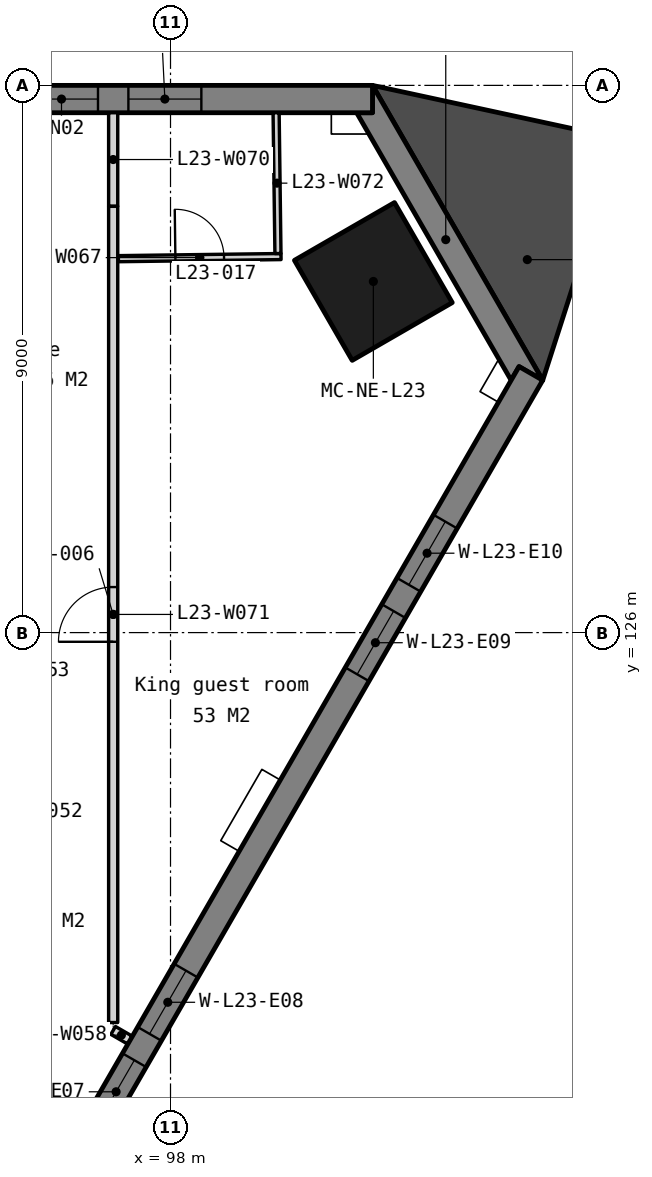
"""IFC4 building model, lengths in metres.
Left out: names, types, materials, properties, quantities, classifications, styles, units other than length and angle.
Written with IfcOpenShell. Run it as: python <this file> out.ifc"""

import sys

from ifc_helpers import new_model, si_unit, direction, frame, frame_2d, origin, origin_2d, place, context, subcontext, project, spatial, polyline, rectangle, outline, extrude, element, fill, save


model = new_model("IFC4")
c1 = context("Model", 3, precision=1e-05, world=origin(), true_north=direction((0.0, 1.0)))
c2 = subcontext(c1, "Body", "Model", "MODEL_VIEW")
j1 = project(units=[si_unit("LENGTHUNIT", "METRE"), si_unit("PLANEANGLEUNIT", "RADIAN")], contexts=[c1])
p1 = place(None, origin())
s1 = spatial("IfcSite", under=j1, at=p1, CompositionType="ELEMENT")
p2 = place(p1, origin())
s2 = spatial("IfcBuilding", under=s1, at=p2, CompositionType="ELEMENT")
p3 = place(p2, frame((0.0, 0.0, 95.8)))
s3 = spatial("IfcBuildingStorey", under=s2, at=p3, CompositionType="ELEMENT", Elevation=95.8)
p4 = place(p3, frame((101.336, 131.775, 0.0), z_axis=(0.0, 0.0, 1.0), x_axis=(-0.5, 0.866025403784, 0.0)))
e1 = element("IfcColumn", 1, at=p4, inside=s3, PredefinedType="COLUMN", context=c2, shape_type="SweptSolid", body=[
    extrude(rectangle(XDim=1.9, YDim=1.9, at=origin_2d()), origin(), (0.0, 0.0, 1.0), 3.5),
])
p5 = place(p3, frame((0.0, 0.0, -0.15)))
e2 = element("IfcWall", 2, at=p5, inside=s3, PredefinedType="SOLIDWALL", context=c2, shape_type="SweptSolid", body=[
    extrude(outline(polyline([(104.122, 130.15), (103.732, 130.375), (103.602, 130.15), (101.062, 134.55), (101.322, 134.55), (101.322, 135.0), (104.122, 130.15)])), origin(), (0.0, 0.0, 1.0), 3.5),
])
p6 = place(p3, frame((101.322, 134.775, -0.15), z_axis=(0.0, 0.0, 1.0), x_axis=(-1.0, 0.0, 0.0)))
e3 = element("IfcWall", 3, at=p6, inside=s3, PredefinedType="SOLIDWALL", context=c2, shape_type="SweptSolid", body=[
    extrude(outline(polyline([(0.0, 0.0), (0.0, 3.5), (36.779, 3.5), (36.779, 0.0), (0.0, 0.0)])), frame((0.0, 0.225, 0.0), z_axis=(0.0, -1.0, 0.0), x_axis=(1.0, 0.0, 0.0)), (0.0, 0.0, 1.0), 0.45),
])
p7 = place(p6, frame((2.814, 0.0, 1.05)))
e4 = element("IfcOpeningElement", 4, at=p7, cuts=e3, PredefinedType="OPENING", context=c2, shape_type="SweptSolid", body=[
    extrude(rectangle(XDim=1.2, YDim=1.5, at=frame_2d((0.6, 0.75))), frame((0.0, 0.235, 0.0), z_axis=(0.0, -1.0, 0.0), x_axis=(1.0, 0.0, 0.0)), (0.0, 0.0, 1.0), 0.47),
])
p8 = place(p6, frame((4.514, 0.0, 1.05)))
e5 = element("IfcOpeningElement", 5, at=p8, cuts=e3, PredefinedType="OPENING", context=c2, shape_type="SweptSolid", body=[
    extrude(rectangle(XDim=1.2, YDim=1.5, at=frame_2d((0.6, 0.75))), frame((0.0, 0.235, 0.0), z_axis=(0.0, -1.0, 0.0), x_axis=(1.0, 0.0, 0.0)), (0.0, 0.0, 1.0), 0.47),
])
p9 = place(p6, frame((11.343, 0.0, 1.05)))
e6 = element("IfcOpeningElement", 6, at=p9, cuts=e3, PredefinedType="OPENING", context=c2, shape_type="SweptSolid", body=[
    extrude(rectangle(XDim=1.2, YDim=1.5, at=frame_2d((0.6, 0.75))), frame((0.0, 0.235, 0.0), z_axis=(0.0, -1.0, 0.0), x_axis=(1.0, 0.0, 0.0)), (0.0, 0.0, 1.0), 0.47),
])
p10 = place(p6, frame((13.043, 0.0, 1.05)))
e7 = element("IfcOpeningElement", 7, at=p10, cuts=e3, PredefinedType="OPENING", context=c2, shape_type="SweptSolid", body=[
    extrude(rectangle(XDim=1.2, YDim=1.5, at=frame_2d((0.6, 0.75))), frame((0.0, 0.235, 0.0), z_axis=(0.0, -1.0, 0.0), x_axis=(1.0, 0.0, 0.0)), (0.0, 0.0, 1.0), 0.47),
])
p11 = place(p6, frame((19.872, 0.0, 1.05)))
e8 = element("IfcOpeningElement", 8, at=p11, cuts=e3, PredefinedType="OPENING", context=c2, shape_type="SweptSolid", body=[
    extrude(rectangle(XDim=1.2, YDim=1.5, at=frame_2d((0.6, 0.75))), frame((0.0, 0.235, 0.0), z_axis=(0.0, -1.0, 0.0), x_axis=(1.0, 0.0, 0.0)), (0.0, 0.0, 1.0), 0.47),
])
p12 = place(p6, frame((21.572, 0.0, 1.05)))
e9 = element("IfcOpeningElement", 9, at=p12, cuts=e3, PredefinedType="OPENING", context=c2, shape_type="SweptSolid", body=[
    extrude(rectangle(XDim=1.2, YDim=1.5, at=frame_2d((0.6, 0.75))), frame((0.0, 0.235, 0.0), z_axis=(0.0, -1.0, 0.0), x_axis=(1.0, 0.0, 0.0)), (0.0, 0.0, 1.0), 0.47),
])
p13 = place(p6, frame((28.4, 0.0, 1.05)))
e10 = element("IfcOpeningElement", 10, at=p13, cuts=e3, PredefinedType="OPENING", context=c2, shape_type="SweptSolid", body=[
    extrude(rectangle(XDim=1.2, YDim=1.5, at=frame_2d((0.6, 0.75))), frame((0.0, 0.235, 0.0), z_axis=(0.0, -1.0, 0.0), x_axis=(1.0, 0.0, 0.0)), (0.0, 0.0, 1.0), 0.47),
])
p14 = place(p6, frame((30.1, 0.0, 1.05)))
e11 = element("IfcOpeningElement", 11, at=p14, cuts=e3, PredefinedType="OPENING", context=c2, shape_type="SweptSolid", body=[
    extrude(rectangle(XDim=1.2, YDim=1.5, at=frame_2d((0.6, 0.75))), frame((0.0, 0.235, 0.0), z_axis=(0.0, -1.0, 0.0), x_axis=(1.0, 0.0, 0.0)), (0.0, 0.0, 1.0), 0.47),
])
p15 = place(p3, frame((82.605, 93.333, -0.15), z_axis=(0.0, 0.0, 1.0), x_axis=(0.500000478905, 0.866025127289, 0.0)))
e12 = element("IfcWall", 12, at=p15, inside=s3, PredefinedType="SOLIDWALL", context=c2, shape_type="SweptSolid", body=[
    extrude(outline(polyline([(42.643, 0.0), (42.643, 3.5), (0.0, 3.5), (0.0, 0.0), (42.643, 0.0)])), frame((0.0, 0.225, 0.0), z_axis=(0.0, -1.0, 0.0), x_axis=(1.0, 0.0, 0.0)), (0.0, 0.0, 1.0), 0.45),
])
p16 = place(p15, frame((2.814, 0.0, 1.05)))
e13 = element("IfcOpeningElement", 13, at=p16, cuts=e12, PredefinedType="OPENING", context=c2, shape_type="SweptSolid", body=[
    extrude(rectangle(XDim=1.2, YDim=1.5, at=frame_2d((0.6, 0.75))), frame((0.0, 0.235, 0.0), z_axis=(0.0, -1.0, 0.0), x_axis=(1.0, 0.0, 0.0)), (0.0, 0.0, 1.0), 0.47),
])
p17 = place(p15, frame((4.514, 0.0, 1.05)))
e14 = element("IfcOpeningElement", 14, at=p17, cuts=e12, PredefinedType="OPENING", context=c2, shape_type="SweptSolid", body=[
    extrude(rectangle(XDim=1.2, YDim=1.5, at=frame_2d((0.6, 0.75))), frame((0.0, 0.235, 0.0), z_axis=(0.0, -1.0, 0.0), x_axis=(1.0, 0.0, 0.0)), (0.0, 0.0, 1.0), 0.47),
])
p18 = place(p15, frame((11.343, 0.0, 1.05)))
e15 = element("IfcOpeningElement", 15, at=p18, cuts=e12, PredefinedType="OPENING", context=c2, shape_type="SweptSolid", body=[
    extrude(rectangle(XDim=1.2, YDim=1.5, at=frame_2d((0.6, 0.75))), frame((0.0, 0.235, 0.0), z_axis=(0.0, -1.0, 0.0), x_axis=(1.0, 0.0, 0.0)), (0.0, 0.0, 1.0), 0.47),
])
p19 = place(p15, frame((13.043, 0.0, 1.05)))
e16 = element("IfcOpeningElement", 16, at=p19, cuts=e12, PredefinedType="OPENING", context=c2, shape_type="SweptSolid", body=[
    extrude(rectangle(XDim=1.2, YDim=1.5, at=frame_2d((0.6, 0.75))), frame((0.0, 0.235, 0.0), z_axis=(0.0, -1.0, 0.0), x_axis=(1.0, 0.0, 0.0)), (0.0, 0.0, 1.0), 0.47),
])
p20 = place(p15, frame((19.872, 0.0, 1.05)))
e17 = element("IfcOpeningElement", 17, at=p20, cuts=e12, PredefinedType="OPENING", context=c2, shape_type="SweptSolid", body=[
    extrude(rectangle(XDim=1.2, YDim=1.5, at=frame_2d((0.6, 0.75))), frame((0.0, 0.235, 0.0), z_axis=(0.0, -1.0, 0.0), x_axis=(1.0, 0.0, 0.0)), (0.0, 0.0, 1.0), 0.47),
])
p21 = place(p15, frame((21.572, 0.0, 1.05)))
e18 = element("IfcOpeningElement", 18, at=p21, cuts=e12, PredefinedType="OPENING", context=c2, shape_type="SweptSolid", body=[
    extrude(rectangle(XDim=1.2, YDim=1.5, at=frame_2d((0.6, 0.75))), frame((0.0, 0.235, 0.0), z_axis=(0.0, -1.0, 0.0), x_axis=(1.0, 0.0, 0.0)), (0.0, 0.0, 1.0), 0.47),
])
p22 = place(p15, frame((28.4, 0.0, 1.05)))
e19 = element("IfcOpeningElement", 19, at=p22, cuts=e12, PredefinedType="OPENING", context=c2, shape_type="SweptSolid", body=[
    extrude(rectangle(XDim=1.2, YDim=1.5, at=frame_2d((0.6, 0.75))), frame((0.0, 0.235, 0.0), z_axis=(0.0, -1.0, 0.0), x_axis=(1.0, 0.0, 0.0)), (0.0, 0.0, 1.0), 0.47),
])
p23 = place(p15, frame((30.1, 0.0, 1.05)))
e20 = element("IfcOpeningElement", 20, at=p23, cuts=e12, PredefinedType="OPENING", context=c2, shape_type="SweptSolid", body=[
    extrude(rectangle(XDim=1.2, YDim=1.5, at=frame_2d((0.6, 0.75))), frame((0.0, 0.235, 0.0), z_axis=(0.0, -1.0, 0.0), x_axis=(1.0, 0.0, 0.0)), (0.0, 0.0, 1.0), 0.47),
])
p24 = place(p15, frame((36.929, 0.0, 1.05)))
e21 = element("IfcOpeningElement", 21, at=p24, cuts=e12, PredefinedType="OPENING", context=c2, shape_type="SweptSolid", body=[
    extrude(rectangle(XDim=1.2, YDim=1.5, at=frame_2d((0.6, 0.75))), frame((0.0, 0.235, 0.0), z_axis=(0.0, -1.0, 0.0), x_axis=(1.0, 0.0, 0.0)), (0.0, 0.0, 1.0), 0.47),
])
p25 = place(p15, frame((38.629, 0.0, 1.05)))
e22 = element("IfcOpeningElement", 22, at=p25, cuts=e12, PredefinedType="OPENING", context=c2, shape_type="SweptSolid", body=[
    extrude(rectangle(XDim=1.2, YDim=1.5, at=frame_2d((0.6, 0.75))), frame((0.0, 0.235, 0.0), z_axis=(0.0, -1.0, 0.0), x_axis=(1.0, 0.0, 0.0)), (0.0, 0.0, 1.0), 0.47),
])
p26 = place(p3, frame((0.0, 0.0, -0.15)))
e23 = element("IfcWall", 23, at=p26, inside=s3, PredefinedType="SOLIDWALL", context=c2, shape_type="SweptSolid", body=[
    extrude(outline(polyline([(104.122, 130.15), (105.397, 134.118), (101.322, 135.0), (104.122, 130.15)])), origin(), (0.0, 0.0, 1.0), 3.5),
])
p27 = place(p3, frame((97.057, 119.457, 0.0), z_axis=(0.0, 0.0, 1.0), x_axis=(0.866159461733, -0.499767732902, 0.0)))
e24 = element("IfcWall", 24, at=p27, inside=s3, PredefinedType="PARTITIONING", context=c2, shape_type="SweptSolid", body=[
    extrude(rectangle(XDim=0.311, YDim=0.15, at=frame_2d((0.156, 0.0))), origin(), (0.0, 0.0, 1.0), 3.35),
])
p28 = place(p3, frame((97.143, 132.15, 0.0), z_axis=(0.0, 0.0, 1.0), x_axis=(0.999914830804, 0.013051097189, 0.0)))
e25 = element("IfcWall", 25, at=p28, inside=s3, PredefinedType="PARTITIONING", context=c2, shape_type="SweptSolid", body=[
    extrude(rectangle(XDim=2.675, YDim=0.1, at=frame_2d((1.337, 0.0))), origin(), (0.0, 0.0, 1.0), 3.35),
])
p29 = place(p28, frame((0.938, 0.0, 0.0)))
e26 = element("IfcOpeningElement", 26, at=p29, cuts=e25, PredefinedType="OPENING", context=c2, shape_type="SweptSolid", body=[
    extrude(rectangle(XDim=0.8, YDim=2.1, at=frame_2d((0.4, 1.05))), frame((0.0, 0.06, 0.0), z_axis=(0.0, -1.0, 0.0), x_axis=(1.0, 0.0, 0.0)), (0.0, 0.0, 1.0), 0.12),
])
p30 = place(p3, frame((97.057, 133.011, 0.0), z_axis=(0.0, 0.0, 1.0), x_axis=(0.0, 1.0, 0.0)))
e27 = element("IfcWall", 27, at=p30, inside=s3, PredefinedType="PARTITIONING", context=c2, shape_type="SweptSolid", body=[
    extrude(rectangle(XDim=1.539, YDim=0.15, at=frame_2d((0.77, 0.0))), origin(), (0.0, 0.0, 1.0), 3.35),
])
p31 = place(p3, frame((97.057, 119.587, 0.0), z_axis=(0.0, 0.0, 1.0), x_axis=(0.0, 1.0, 0.0)))
e28 = element("IfcWall", 28, at=p31, inside=s3, PredefinedType="PARTITIONING", context=c2, shape_type="SweptSolid", body=[
    extrude(rectangle(XDim=13.424, YDim=0.15, at=frame_2d((6.712, 0.0))), origin(), (0.0, 0.0, 1.0), 3.35),
])
p32 = place(p31, frame((6.262, 0.0, 0.0)))
e29 = element("IfcOpeningElement", 29, at=p32, cuts=e28, PredefinedType="OPENING", context=c2, shape_type="SweptSolid", body=[
    extrude(rectangle(XDim=0.9, YDim=2.1, at=frame_2d((0.45, 1.05))), frame((0.0, 0.085, 0.0), z_axis=(0.0, -1.0, 0.0), x_axis=(1.0, 0.0, 0.0)), (0.0, 0.0, 1.0), 0.17),
])
p33 = place(p3, frame((99.737, 134.55, 0.0), z_axis=(0.0, 0.0, 1.0), x_axis=(0.012965387027, -0.999915945837, 0.0)))
e30 = element("IfcWall", 30, at=p33, inside=s3, PredefinedType="PARTITIONING", context=c2, shape_type="SweptSolid", body=[
    extrude(rectangle(XDim=2.316, YDim=0.1, at=frame_2d((1.158, 0.0))), origin(), (0.0, 0.0, 1.0), 3.35),
])
p34 = place(p7, origin())
e31 = element("IfcWindow", 31, at=p34, inside=s3, PartitioningType="SINGLE_PANEL", PredefinedType="WINDOW", context=c2, shape_type="SweptSolid", body=[
    extrude(rectangle(XDim=1.2, YDim=1.5, at=frame_2d((0.6, 0.75))), frame((0.0, 0.03, 0.0), z_axis=(0.0, -1.0, 0.0), x_axis=(1.0, 0.0, 0.0)), (0.0, 0.0, 1.0), 0.06),
])
fill(e4, e31)
p35 = place(p8, origin())
e32 = element("IfcWindow", 32, at=p35, inside=s3, PartitioningType="SINGLE_PANEL", PredefinedType="WINDOW", context=c2, shape_type="SweptSolid", body=[
    extrude(rectangle(XDim=1.2, YDim=1.5, at=frame_2d((0.6, 0.75))), frame((0.0, 0.03, 0.0), z_axis=(0.0, -1.0, 0.0), x_axis=(1.0, 0.0, 0.0)), (0.0, 0.0, 1.0), 0.06),
])
fill(e5, e32)
p36 = place(p22, origin())
e33 = element("IfcWindow", 33, at=p36, inside=s3, PartitioningType="SINGLE_PANEL", PredefinedType="WINDOW", context=c2, shape_type="SweptSolid", body=[
    extrude(rectangle(XDim=1.2, YDim=1.5, at=frame_2d((0.6, 0.75))), frame((0.0, 0.03, 0.0), z_axis=(0.0, -1.0, 0.0), x_axis=(1.0, 0.0, 0.0)), (0.0, 0.0, 1.0), 0.06),
])
fill(e19, e33)
p37 = place(p23, origin())
e34 = element("IfcWindow", 34, at=p37, inside=s3, PartitioningType="SINGLE_PANEL", PredefinedType="WINDOW", context=c2, shape_type="SweptSolid", body=[
    extrude(rectangle(XDim=1.2, YDim=1.5, at=frame_2d((0.6, 0.75))), frame((0.0, 0.03, 0.0), z_axis=(0.0, -1.0, 0.0), x_axis=(1.0, 0.0, 0.0)), (0.0, 0.0, 1.0), 0.06),
])
fill(e20, e34)
p38 = place(p24, origin())
e35 = element("IfcWindow", 35, at=p38, inside=s3, PartitioningType="SINGLE_PANEL", PredefinedType="WINDOW", context=c2, shape_type="SweptSolid", body=[
    extrude(rectangle(XDim=1.2, YDim=1.5, at=frame_2d((0.6, 0.75))), frame((0.0, 0.03, 0.0), z_axis=(0.0, -1.0, 0.0), x_axis=(1.0, 0.0, 0.0)), (0.0, 0.0, 1.0), 0.06),
])
fill(e21, e35)
p39 = place(p25, origin())
e36 = element("IfcWindow", 36, at=p39, inside=s3, PartitioningType="SINGLE_PANEL", PredefinedType="WINDOW", context=c2, shape_type="SweptSolid", body=[
    extrude(rectangle(XDim=1.2, YDim=1.5, at=frame_2d((0.6, 0.75))), frame((0.0, 0.03, 0.0), z_axis=(0.0, -1.0, 0.0), x_axis=(1.0, 0.0, 0.0)), (0.0, 0.0, 1.0), 0.06),
])
fill(e22, e36)
p40 = place(p32, origin())
e37 = element("IfcDoor", 37, at=p40, inside=s3, OperationType="SINGLE_SWING_LEFT", PredefinedType="DOOR", context=c2, shape_type="SweptSolid", body=[
    extrude(rectangle(XDim=0.9, YDim=2.1, at=frame_2d((0.45, 1.05))), frame((0.0, 0.025, 0.0), z_axis=(0.0, -1.0, 0.0), x_axis=(1.0, 0.0, 0.0)), (0.0, 0.0, 1.0), 0.05),
])
fill(e29, e37)
p41 = place(p29, origin())
e38 = element("IfcDoor", 38, at=p41, inside=s3, OperationType="SINGLE_SWING_LEFT", PredefinedType="DOOR", context=c2, shape_type="SweptSolid", body=[
    extrude(rectangle(XDim=0.8, YDim=2.1, at=frame_2d((0.4, 1.05))), frame((0.0, 0.025, 0.0), z_axis=(0.0, -1.0, 0.0), x_axis=(1.0, 0.0, 0.0)), (0.0, 0.0, 1.0), 0.05),
])
fill(e26, e38)
save(model, sys.argv[1])
